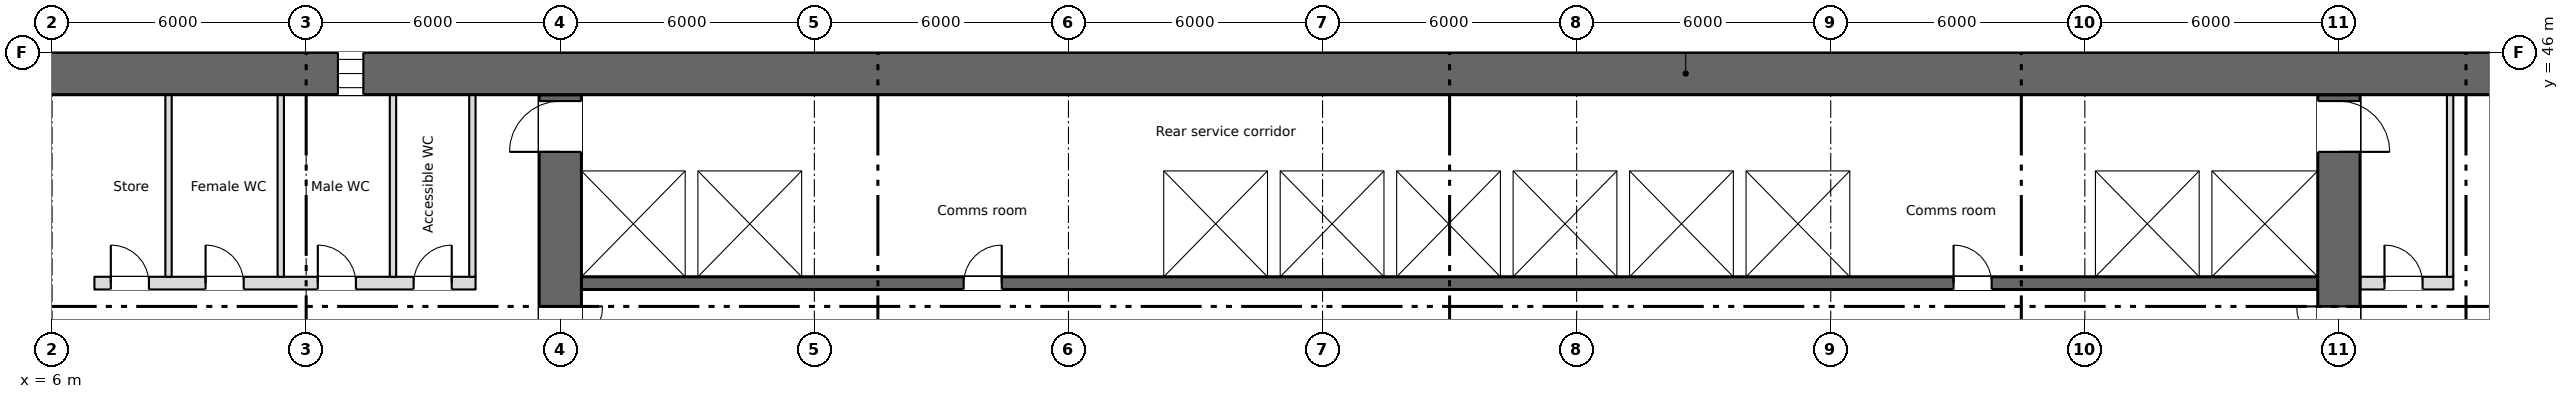
"""IFC4 building model, lengths in metres.
Left out: names, types, materials, properties, quantities, classifications, styles, units other than length and angle.
Written with IfcOpenShell. Run it as: python <this file> out.ifc"""

import sys

from ifc_helpers import new_model, si_unit, direction, frame, frame_2d, origin, place, context, subcontext, project, spatial, rectangle, extrude, element, fill, save


model = new_model("IFC4")
c1 = context("Model", 3, precision=1e-05, world=origin(), true_north=direction((0.0, 1.0)))
c2 = subcontext(c1, "Body", "Model", "MODEL_VIEW")
j1 = project(units=[si_unit("LENGTHUNIT", "METRE"), si_unit("PLANEANGLEUNIT", "RADIAN")], contexts=[c1])
p1 = place(None, origin())
s1 = spatial("IfcSite", under=j1, at=p1, CompositionType="ELEMENT")
p2 = place(p1, origin())
s2 = spatial("IfcBuilding", under=s1, at=p2, CompositionType="ELEMENT")
p3 = place(p2, frame((0.0, 0.0, 78.75)))
s3 = spatial("IfcBuildingStorey", under=s2, at=p3, CompositionType="ELEMENT", Elevation=78.75)
p4 = place(p3, frame((5.55, 45.5, 0.0), z_axis=(0.0, 0.0, 1.0), x_axis=(1.0, 0.0, 0.0)))
e1 = element("IfcWall", 1, at=p4, inside=s3, PredefinedType="SHEAR", context=c2, shape_type="SweptSolid", body=[
    extrude(rectangle(XDim=66.9, YDim=1.0, at=frame_2d((33.45, 0.0))), origin(), (0.0, 0.0, 1.0), 3.35),
])
p5 = place(p4, frame((7.2, 0.0, 0.6)))
e2 = element("IfcOpeningElement", 2, at=p5, cuts=e1, PredefinedType="OPENING", context=c2, shape_type="SweptSolid", body=[
    extrude(rectangle(XDim=0.6, YDim=2.4, at=frame_2d((0.3, 1.2))), frame((0.0, 0.51, 0.0), z_axis=(0.0, -1.0, 0.0), x_axis=(1.0, 0.0, 0.0)), (0.0, 0.0, 1.0), 1.02),
])
p6 = place(p4, frame((61.2, 0.0, 0.6)))
e3 = element("IfcOpeningElement", 3, at=p6, cuts=e1, PredefinedType="OPENING", context=c2, shape_type="SweptSolid", body=[
    extrude(rectangle(XDim=0.6, YDim=2.4, at=frame_2d((0.3, 1.2))), frame((0.0, 0.51, 0.0), z_axis=(0.0, -1.0, 0.0), x_axis=(1.0, 0.0, 0.0)), (0.0, 0.0, 1.0), 1.02),
])
p7 = place(p3, frame((6.85, 28.4, 0.0), z_axis=(0.0, 0.0, 1.0), x_axis=(0.0, 1.0, 0.0)))
e4 = element("IfcWall", 4, at=p7, inside=s3, PredefinedType="SHEAR", context=c2, shape_type="SweptSolid", body=[
    extrude(rectangle(XDim=16.6, YDim=0.3, at=frame_2d((8.3, 0.0))), origin(), (0.0, 0.0, 1.0), 3.35),
])
p8 = place(p3, frame((18.0, 28.4, 0.0), z_axis=(0.0, 0.0, 1.0), x_axis=(0.0, 1.0, 0.0)))
e5 = element("IfcWall", 5, at=p8, inside=s3, PredefinedType="SHEAR", context=c2, shape_type="SweptSolid", body=[
    extrude(rectangle(XDim=16.6, YDim=1.0, at=frame_2d((8.3, 0.0))), origin(), (0.0, 0.0, 1.0), 3.35),
])
p9 = place(p8, frame((9.6, 0.0, 0.0)))
e6 = element("IfcOpeningElement", 6, at=p9, cuts=e5, PredefinedType="OPENING", context=c2, shape_type="SweptSolid", body=[
    extrude(rectangle(XDim=2.0, YDim=2.1, at=frame_2d((1.0, 1.05))), frame((0.0, 0.51, 0.0), z_axis=(0.0, -1.0, 0.0), x_axis=(1.0, 0.0, 0.0)), (0.0, 0.0, 1.0), 1.02),
])
p10 = place(p8, frame((15.25, 0.0, 0.0)))
e7 = element("IfcOpeningElement", 7, at=p10, cuts=e5, PredefinedType="OPENING", context=c2, shape_type="SweptSolid", body=[
    extrude(rectangle(XDim=1.2, YDim=2.1, at=frame_2d((0.6, 1.05))), frame((0.0, 0.51, 0.0), z_axis=(0.0, -1.0, 0.0), x_axis=(1.0, 0.0, 0.0)), (0.0, 0.0, 1.0), 1.02),
])
p11 = place(p3, frame((60.0, 28.4, 0.0), z_axis=(0.0, 0.0, 1.0), x_axis=(0.0, 1.0, 0.0)))
e8 = element("IfcWall", 8, at=p11, inside=s3, PredefinedType="SHEAR", context=c2, shape_type="SweptSolid", body=[
    extrude(rectangle(XDim=16.6, YDim=1.0, at=frame_2d((8.3, 0.0))), origin(), (0.0, 0.0, 1.0), 3.35),
])
p12 = place(p11, frame((9.6, 0.0, 0.0)))
e9 = element("IfcOpeningElement", 9, at=p12, cuts=e8, PredefinedType="OPENING", context=c2, shape_type="SweptSolid", body=[
    extrude(rectangle(XDim=2.0, YDim=2.1, at=frame_2d((1.0, 1.05))), frame((0.0, 0.51, 0.0), z_axis=(0.0, -1.0, 0.0), x_axis=(1.0, 0.0, 0.0)), (0.0, 0.0, 1.0), 1.02),
])
p13 = place(p11, frame((15.25, 0.0, 0.0)))
e10 = element("IfcOpeningElement", 10, at=p13, cuts=e8, PredefinedType="OPENING", context=c2, shape_type="SweptSolid", body=[
    extrude(rectangle(XDim=1.2, YDim=2.1, at=frame_2d((0.6, 1.05))), frame((0.0, 0.51, 0.0), z_axis=(0.0, -1.0, 0.0), x_axis=(1.0, 0.0, 0.0)), (0.0, 0.0, 1.0), 1.02),
])
p14 = place(p3, frame((18.5, 40.55, 0.0), z_axis=(0.0, 0.0, 1.0), x_axis=(1.0, 0.0, 0.0)))
e11 = element("IfcWall", 11, at=p14, inside=s3, PredefinedType="SHEAR", context=c2, shape_type="SweptSolid", body=[
    extrude(rectangle(XDim=41.0, YDim=0.3, at=frame_2d((20.5, 0.0))), origin(), (0.0, 0.0, 1.0), 3.35),
])
p15 = place(p14, frame((9.025, 0.0, 0.0)))
e12 = element("IfcOpeningElement", 12, at=p15, cuts=e11, PredefinedType="OPENING", context=c2, shape_type="SweptSolid", body=[
    extrude(rectangle(XDim=0.9, YDim=2.1, at=frame_2d((0.45, 1.05))), frame((0.0, 0.16, 0.0), z_axis=(0.0, -1.0, 0.0), x_axis=(1.0, 0.0, 0.0)), (0.0, 0.0, 1.0), 0.32),
])
p16 = place(p14, frame((32.4, 0.0, 0.0)))
e13 = element("IfcOpeningElement", 13, at=p16, cuts=e11, PredefinedType="OPENING", context=c2, shape_type="SweptSolid", body=[
    extrude(rectangle(XDim=0.9, YDim=2.1, at=frame_2d((0.45, 1.05))), frame((0.0, 0.16, 0.0), z_axis=(0.0, -1.0, 0.0), x_axis=(1.0, 0.0, 0.0)), (0.0, 0.0, 1.0), 0.32),
])
p17 = place(p14, frame((14.425, 0.0, 0.0)))
e14 = element("IfcOpeningElement", 14, at=p17, cuts=e11, PredefinedType="OPENING", context=c2, shape_type="SweptSolid", body=[
    extrude(rectangle(XDim=1.1, YDim=2.1, at=frame_2d((0.55, 1.05))), frame((0.0, 0.16, 0.0), z_axis=(0.0, -1.0, 0.0), x_axis=(1.0, 0.0, 0.0)), (0.0, 0.0, 1.0), 0.32),
])
p18 = place(p14, frame((17.175, 0.0, 0.0)))
e15 = element("IfcOpeningElement", 15, at=p18, cuts=e11, PredefinedType="OPENING", context=c2, shape_type="SweptSolid", body=[
    extrude(rectangle(XDim=1.1, YDim=2.1, at=frame_2d((0.55, 1.05))), frame((0.0, 0.16, 0.0), z_axis=(0.0, -1.0, 0.0), x_axis=(1.0, 0.0, 0.0)), (0.0, 0.0, 1.0), 0.32),
])
p19 = place(p14, frame((19.925, 0.0, 0.0)))
e16 = element("IfcOpeningElement", 16, at=p19, cuts=e11, PredefinedType="OPENING", context=c2, shape_type="SweptSolid", body=[
    extrude(rectangle(XDim=1.1, YDim=2.1, at=frame_2d((0.55, 1.05))), frame((0.0, 0.16, 0.0), z_axis=(0.0, -1.0, 0.0), x_axis=(1.0, 0.0, 0.0)), (0.0, 0.0, 1.0), 0.32),
])
p20 = place(p14, frame((22.675, 0.0, 0.0)))
e17 = element("IfcOpeningElement", 17, at=p20, cuts=e11, PredefinedType="OPENING", context=c2, shape_type="SweptSolid", body=[
    extrude(rectangle(XDim=1.1, YDim=2.1, at=frame_2d((0.55, 1.05))), frame((0.0, 0.16, 0.0), z_axis=(0.0, -1.0, 0.0), x_axis=(1.0, 0.0, 0.0)), (0.0, 0.0, 1.0), 0.32),
])
p21 = place(p14, frame((36.375, 0.0, 0.0)))
e18 = element("IfcOpeningElement", 18, at=p21, cuts=e11, PredefinedType="OPENING", context=c2, shape_type="SweptSolid", body=[
    extrude(rectangle(XDim=1.2, YDim=2.1, at=frame_2d((0.6, 1.05))), frame((0.0, 0.16, 0.0), z_axis=(0.0, -1.0, 0.0), x_axis=(1.0, 0.0, 0.0)), (0.0, 0.0, 1.0), 0.32),
])
p22 = place(p14, frame((39.15, 0.0, 0.0)))
e19 = element("IfcOpeningElement", 19, at=p22, cuts=e11, PredefinedType="OPENING", context=c2, shape_type="SweptSolid", body=[
    extrude(rectangle(XDim=1.2, YDim=2.1, at=frame_2d((0.6, 1.05))), frame((0.0, 0.16, 0.0), z_axis=(0.0, -1.0, 0.0), x_axis=(1.0, 0.0, 0.0)), (0.0, 0.0, 1.0), 0.32),
])
p23 = place(p3, frame((18.5, 43.35, 0.0), z_axis=(0.0, 0.0, 1.0), x_axis=(1.0, 0.0, 0.0)))
e20 = element("IfcWall", 20, at=p23, inside=s3, PredefinedType="SHEAR", context=c2, shape_type="SweptSolid", body=[
    extrude(rectangle(XDim=41.0, YDim=0.3, at=frame_2d((20.5, 0.0))), origin(), (0.0, 0.0, 1.0), 3.35),
])
p24 = place(p3, frame((7.0, 40.55, 0.0), z_axis=(0.0, 0.0, 1.0), x_axis=(1.0, 0.0, 0.0)))
e21 = element("IfcWall", 21, at=p24, inside=s3, PredefinedType="PARTITIONING", context=c2, shape_type="SweptSolid", body=[
    extrude(rectangle(XDim=9.0, YDim=0.3, at=frame_2d((4.5, 0.0))), origin(), (0.0, 0.0, 1.0), 3.35),
])
p25 = place(p24, frame((0.387, 0.0, 0.0)))
e22 = element("IfcOpeningElement", 22, at=p25, cuts=e21, PredefinedType="OPENING", context=c2, shape_type="SweptSolid", body=[
    extrude(rectangle(XDim=0.9, YDim=2.1, at=frame_2d((0.45, 1.05))), frame((0.0, 0.16, 0.0), z_axis=(0.0, -1.0, 0.0), x_axis=(1.0, 0.0, 0.0)), (0.0, 0.0, 1.0), 0.32),
])
p26 = place(p24, frame((2.625, 0.0, 0.0)))
e23 = element("IfcOpeningElement", 23, at=p26, cuts=e21, PredefinedType="OPENING", context=c2, shape_type="SweptSolid", body=[
    extrude(rectangle(XDim=0.9, YDim=2.1, at=frame_2d((0.45, 1.05))), frame((0.0, 0.16, 0.0), z_axis=(0.0, -1.0, 0.0), x_axis=(1.0, 0.0, 0.0)), (0.0, 0.0, 1.0), 0.32),
])
p27 = place(p24, frame((5.275, 0.0, 0.0)))
e24 = element("IfcOpeningElement", 24, at=p27, cuts=e21, PredefinedType="OPENING", context=c2, shape_type="SweptSolid", body=[
    extrude(rectangle(XDim=0.9, YDim=2.1, at=frame_2d((0.45, 1.05))), frame((0.0, 0.16, 0.0), z_axis=(0.0, -1.0, 0.0), x_axis=(1.0, 0.0, 0.0)), (0.0, 0.0, 1.0), 0.32),
])
p28 = place(p24, frame((7.538, 0.0, 0.0)))
e25 = element("IfcOpeningElement", 25, at=p28, cuts=e21, PredefinedType="OPENING", context=c2, shape_type="SweptSolid", body=[
    extrude(rectangle(XDim=0.9, YDim=2.1, at=frame_2d((0.45, 1.05))), frame((0.0, 0.16, 0.0), z_axis=(0.0, -1.0, 0.0), x_axis=(1.0, 0.0, 0.0)), (0.0, 0.0, 1.0), 0.32),
])
p29 = place(p3, frame((60.5, 40.55, 0.0), z_axis=(0.0, 0.0, 1.0), x_axis=(1.0, 0.0, 0.0)))
e26 = element("IfcWall", 26, at=p29, inside=s3, PredefinedType="PARTITIONING", context=c2, shape_type="SweptSolid", body=[
    extrude(rectangle(XDim=2.2, YDim=0.3, at=frame_2d((1.1, 0.0))), origin(), (0.0, 0.0, 1.0), 3.35),
])
p30 = place(p29, frame((0.575, 0.0, 0.0)))
e27 = element("IfcOpeningElement", 27, at=p30, cuts=e26, PredefinedType="OPENING", context=c2, shape_type="SweptSolid", body=[
    extrude(rectangle(XDim=0.9, YDim=2.1, at=frame_2d((0.45, 1.05))), frame((0.0, 0.16, 0.0), z_axis=(0.0, -1.0, 0.0), x_axis=(1.0, 0.0, 0.0)), (0.0, 0.0, 1.0), 0.32),
])
for number, where, z_axis, x_axis in (
    (28, (21.1, 40.7, 0.0), (0.0, 0.0, 1.0), (0.0, 1.0, 0.0)),
    (29, (23.85, 40.7, 0.0), (0.0, 0.0, 1.0), (0.0, 1.0, 0.0)),
    (30, (32.1, 40.7, 0.0), (0.0, 0.0, 1.0), (0.0, 1.0, 0.0)),
    (31, (34.85, 40.7, 0.0), (0.0, 0.0, 1.0), (0.0, 1.0, 0.0)),
    (32, (37.6, 40.7, 0.0), (0.0, 0.0, 1.0), (0.0, 1.0, 0.0)),
    (33, (40.35, 40.7, 0.0), (0.0, 0.0, 1.0), (0.0, 1.0, 0.0)),
    (34, (43.1, 40.7, 0.0), (0.0, 0.0, 1.0), (0.0, 1.0, 0.0)),
    (35, (45.85, 40.7, 0.0), (0.0, 0.0, 1.0), (0.0, 1.0, 0.0)),
    (36, (48.6, 40.7, 0.0), (0.0, 0.0, 1.0), (0.0, 1.0, 0.0)),
    (37, (54.1, 40.7, 0.0), (0.0, 0.0, 1.0), (0.0, 1.0, 0.0)),
    (38, (56.85, 40.7, 0.0), (0.0, 0.0, 1.0), (0.0, 1.0, 0.0)),
):
    element("IfcWall", number, at=place(p3, frame(where, z_axis=z_axis, x_axis=x_axis)), inside=s3, PredefinedType="SHEAR", context=c2, shape_type="SweptSolid", body=[
        extrude(rectangle(XDim=2.5, YDim=0.3, at=frame_2d((1.25, 0.0))), origin(), (0.0, 0.0, 1.0), 3.35),
    ])
for number, where, z_axis, x_axis in (
    (39, (15.925, 40.7, 0.0), (0.0, 0.0, 1.0), (0.0, 1.0, 0.0)),
    (40, (62.625, 40.7, 0.0), (0.0, 0.0, 1.0), (0.0, 1.0, 0.0)),
    (41, (8.75, 40.7, 0.0), (0.0, 0.0, 1.0), (0.0, 1.0, 0.0)),
    (42, (11.4, 40.7, 0.0), (0.0, 0.0, 1.0), (0.0, 1.0, 0.0)),
    (43, (14.05, 40.7, 0.0), (0.0, 0.0, 1.0), (0.0, 1.0, 0.0)),
):
    element("IfcWall", number, at=place(p3, frame(where, z_axis=z_axis, x_axis=x_axis)), inside=s3, PredefinedType="PARTITIONING", context=c2, shape_type="SweptSolid", body=[
        extrude(rectangle(XDim=4.3, YDim=0.15, at=frame_2d((2.15, 0.0))), origin(), (0.0, 0.0, 1.0), 3.35),
    ])
p31 = place(p5, origin())
e44 = element("IfcWindow", 44, at=p31, inside=s3, PartitioningType="SINGLE_PANEL", PredefinedType="WINDOW", context=c2, shape_type="SweptSolid", body=[
    extrude(rectangle(XDim=0.6, YDim=2.4, at=frame_2d((0.3, 1.2))), frame((0.0, 0.03, 0.0), z_axis=(0.0, -1.0, 0.0), x_axis=(1.0, 0.0, 0.0)), (0.0, 0.0, 1.0), 0.06),
])
fill(e2, e44)
p32 = place(p25, origin())
e45 = element("IfcDoor", 45, at=p32, inside=s3, OperationType="SINGLE_SWING_LEFT", PredefinedType="DOOR", context=c2, shape_type="SweptSolid", body=[
    extrude(rectangle(XDim=0.9, YDim=2.1, at=frame_2d((0.45, 1.05))), frame((0.0, 0.025, 0.0), z_axis=(0.0, -1.0, 0.0), x_axis=(1.0, 0.0, 0.0)), (0.0, 0.0, 1.0), 0.05),
])
fill(e22, e45)
p33 = place(p26, origin())
e46 = element("IfcDoor", 46, at=p33, inside=s3, OperationType="SINGLE_SWING_LEFT", PredefinedType="DOOR", context=c2, shape_type="SweptSolid", body=[
    extrude(rectangle(XDim=0.9, YDim=2.1, at=frame_2d((0.45, 1.05))), frame((0.0, 0.025, 0.0), z_axis=(0.0, -1.0, 0.0), x_axis=(1.0, 0.0, 0.0)), (0.0, 0.0, 1.0), 0.05),
])
fill(e23, e46)
p34 = place(p27, origin())
e47 = element("IfcDoor", 47, at=p34, inside=s3, OperationType="SINGLE_SWING_LEFT", PredefinedType="DOOR", context=c2, shape_type="SweptSolid", body=[
    extrude(rectangle(XDim=0.9, YDim=2.1, at=frame_2d((0.45, 1.05))), frame((0.0, 0.025, 0.0), z_axis=(0.0, -1.0, 0.0), x_axis=(1.0, 0.0, 0.0)), (0.0, 0.0, 1.0), 0.05),
])
fill(e24, e47)
p35 = place(p28, origin())
e48 = element("IfcDoor", 48, at=p35, inside=s3, OperationType="SINGLE_SWING_RIGHT", PredefinedType="DOOR", context=c2, shape_type="SweptSolid", body=[
    extrude(rectangle(XDim=0.9, YDim=2.1, at=frame_2d((0.45, 1.05))), frame((0.0, 0.025, 0.0), z_axis=(0.0, -1.0, 0.0), x_axis=(1.0, 0.0, 0.0)), (0.0, 0.0, 1.0), 0.05),
])
fill(e25, e48)
p36 = place(p30, origin())
e49 = element("IfcDoor", 49, at=p36, inside=s3, OperationType="SINGLE_SWING_LEFT", PredefinedType="DOOR", context=c2, shape_type="SweptSolid", body=[
    extrude(rectangle(XDim=0.9, YDim=2.1, at=frame_2d((0.45, 1.05))), frame((0.0, 0.025, 0.0), z_axis=(0.0, -1.0, 0.0), x_axis=(1.0, 0.0, 0.0)), (0.0, 0.0, 1.0), 0.05),
])
fill(e27, e49)
p37 = place(p15, origin())
e50 = element("IfcDoor", 50, at=p37, inside=s3, OperationType="SINGLE_SWING_RIGHT", PredefinedType="DOOR", context=c2, shape_type="SweptSolid", body=[
    extrude(rectangle(XDim=0.9, YDim=2.1, at=frame_2d((0.45, 1.05))), frame((0.0, 0.025, 0.0), z_axis=(0.0, -1.0, 0.0), x_axis=(1.0, 0.0, 0.0)), (0.0, 0.0, 1.0), 0.05),
])
fill(e12, e50)
p38 = place(p16, origin())
e51 = element("IfcDoor", 51, at=p38, inside=s3, OperationType="SINGLE_SWING_LEFT", PredefinedType="DOOR", context=c2, shape_type="SweptSolid", body=[
    extrude(rectangle(XDim=0.9, YDim=2.1, at=frame_2d((0.45, 1.05))), frame((0.0, 0.025, 0.0), z_axis=(0.0, -1.0, 0.0), x_axis=(1.0, 0.0, 0.0)), (0.0, 0.0, 1.0), 0.05),
])
fill(e13, e51)
p39 = place(p17, origin())
e52 = element("IfcDoor", 52, at=p39, inside=s3, OperationType="SLIDING_TO_LEFT", PredefinedType="DOOR", context=c2, shape_type="SweptSolid", body=[
    extrude(rectangle(XDim=1.1, YDim=2.1, at=frame_2d((0.55, 1.05))), frame((0.0, 0.025, 0.0), z_axis=(0.0, -1.0, 0.0), x_axis=(1.0, 0.0, 0.0)), (0.0, 0.0, 1.0), 0.05),
])
fill(e14, e52)
p40 = place(p18, origin())
e53 = element("IfcDoor", 53, at=p40, inside=s3, OperationType="SLIDING_TO_LEFT", PredefinedType="DOOR", context=c2, shape_type="SweptSolid", body=[
    extrude(rectangle(XDim=1.1, YDim=2.1, at=frame_2d((0.55, 1.05))), frame((0.0, 0.025, 0.0), z_axis=(0.0, -1.0, 0.0), x_axis=(1.0, 0.0, 0.0)), (0.0, 0.0, 1.0), 0.05),
])
fill(e15, e53)
p41 = place(p19, origin())
e54 = element("IfcDoor", 54, at=p41, inside=s3, OperationType="SLIDING_TO_LEFT", PredefinedType="DOOR", context=c2, shape_type="SweptSolid", body=[
    extrude(rectangle(XDim=1.1, YDim=2.1, at=frame_2d((0.55, 1.05))), frame((0.0, 0.025, 0.0), z_axis=(0.0, -1.0, 0.0), x_axis=(1.0, 0.0, 0.0)), (0.0, 0.0, 1.0), 0.05),
])
fill(e16, e54)
p42 = place(p20, origin())
e55 = element("IfcDoor", 55, at=p42, inside=s3, OperationType="SLIDING_TO_LEFT", PredefinedType="DOOR", context=c2, shape_type="SweptSolid", body=[
    extrude(rectangle(XDim=1.1, YDim=2.1, at=frame_2d((0.55, 1.05))), frame((0.0, 0.025, 0.0), z_axis=(0.0, -1.0, 0.0), x_axis=(1.0, 0.0, 0.0)), (0.0, 0.0, 1.0), 0.05),
])
fill(e17, e55)
p43 = place(p21, origin())
e56 = element("IfcDoor", 56, at=p43, inside=s3, OperationType="SLIDING_TO_LEFT", PredefinedType="DOOR", context=c2, shape_type="SweptSolid", body=[
    extrude(rectangle(XDim=1.2, YDim=2.1, at=frame_2d((0.6, 1.05))), frame((0.0, 0.025, 0.0), z_axis=(0.0, -1.0, 0.0), x_axis=(1.0, 0.0, 0.0)), (0.0, 0.0, 1.0), 0.05),
])
fill(e18, e56)
p44 = place(p22, origin())
e57 = element("IfcDoor", 57, at=p44, inside=s3, OperationType="SLIDING_TO_LEFT", PredefinedType="DOOR", context=c2, shape_type="SweptSolid", body=[
    extrude(rectangle(XDim=1.2, YDim=2.1, at=frame_2d((0.6, 1.05))), frame((0.0, 0.025, 0.0), z_axis=(0.0, -1.0, 0.0), x_axis=(1.0, 0.0, 0.0)), (0.0, 0.0, 1.0), 0.05),
])
fill(e19, e57)
p45 = place(p9, origin())
e58 = element("IfcDoor", 58, at=p45, inside=s3, OperationType="DOUBLE_DOOR_SINGLE_SWING", PredefinedType="DOOR", context=c2, shape_type="SweptSolid", body=[
    extrude(rectangle(XDim=2.0, YDim=2.1, at=frame_2d((1.0, 1.05))), frame((0.0, 0.025, 0.0), z_axis=(0.0, -1.0, 0.0), x_axis=(1.0, 0.0, 0.0)), (0.0, 0.0, 1.0), 0.05),
])
fill(e6, e58)
p46 = place(p12, origin())
e59 = element("IfcDoor", 59, at=p46, inside=s3, OperationType="DOUBLE_DOOR_SINGLE_SWING", PredefinedType="DOOR", context=c2, shape_type="SweptSolid", body=[
    extrude(rectangle(XDim=2.0, YDim=2.1, at=frame_2d((1.0, 1.05))), frame((0.0, 0.025, 0.0), z_axis=(0.0, -1.0, 0.0), x_axis=(1.0, 0.0, 0.0)), (0.0, 0.0, 1.0), 0.05),
])
fill(e9, e59)
p47 = place(p10, origin())
e60 = element("IfcDoor", 60, at=p47, inside=s3, OperationType="SINGLE_SWING_LEFT", PredefinedType="DOOR", context=c2, shape_type="SweptSolid", body=[
    extrude(rectangle(XDim=1.2, YDim=2.1, at=frame_2d((0.6, 1.05))), frame((0.0, 0.025, 0.0), z_axis=(0.0, -1.0, 0.0), x_axis=(1.0, 0.0, 0.0)), (0.0, 0.0, 1.0), 0.05),
])
fill(e7, e60)
p48 = place(p13, origin())
e61 = element("IfcDoor", 61, at=p48, inside=s3, OperationType="SINGLE_SWING_LEFT", PredefinedType="DOOR", context=c2, shape_type="SweptSolid", body=[
    extrude(rectangle(XDim=1.2, YDim=2.1, at=frame_2d((0.6, 1.05))), frame((0.0, 0.025, 0.0), z_axis=(0.0, -1.0, 0.0), x_axis=(1.0, 0.0, 0.0)), (0.0, 0.0, 1.0), 0.05),
])
fill(e10, e61)
save(model, sys.argv[1])
